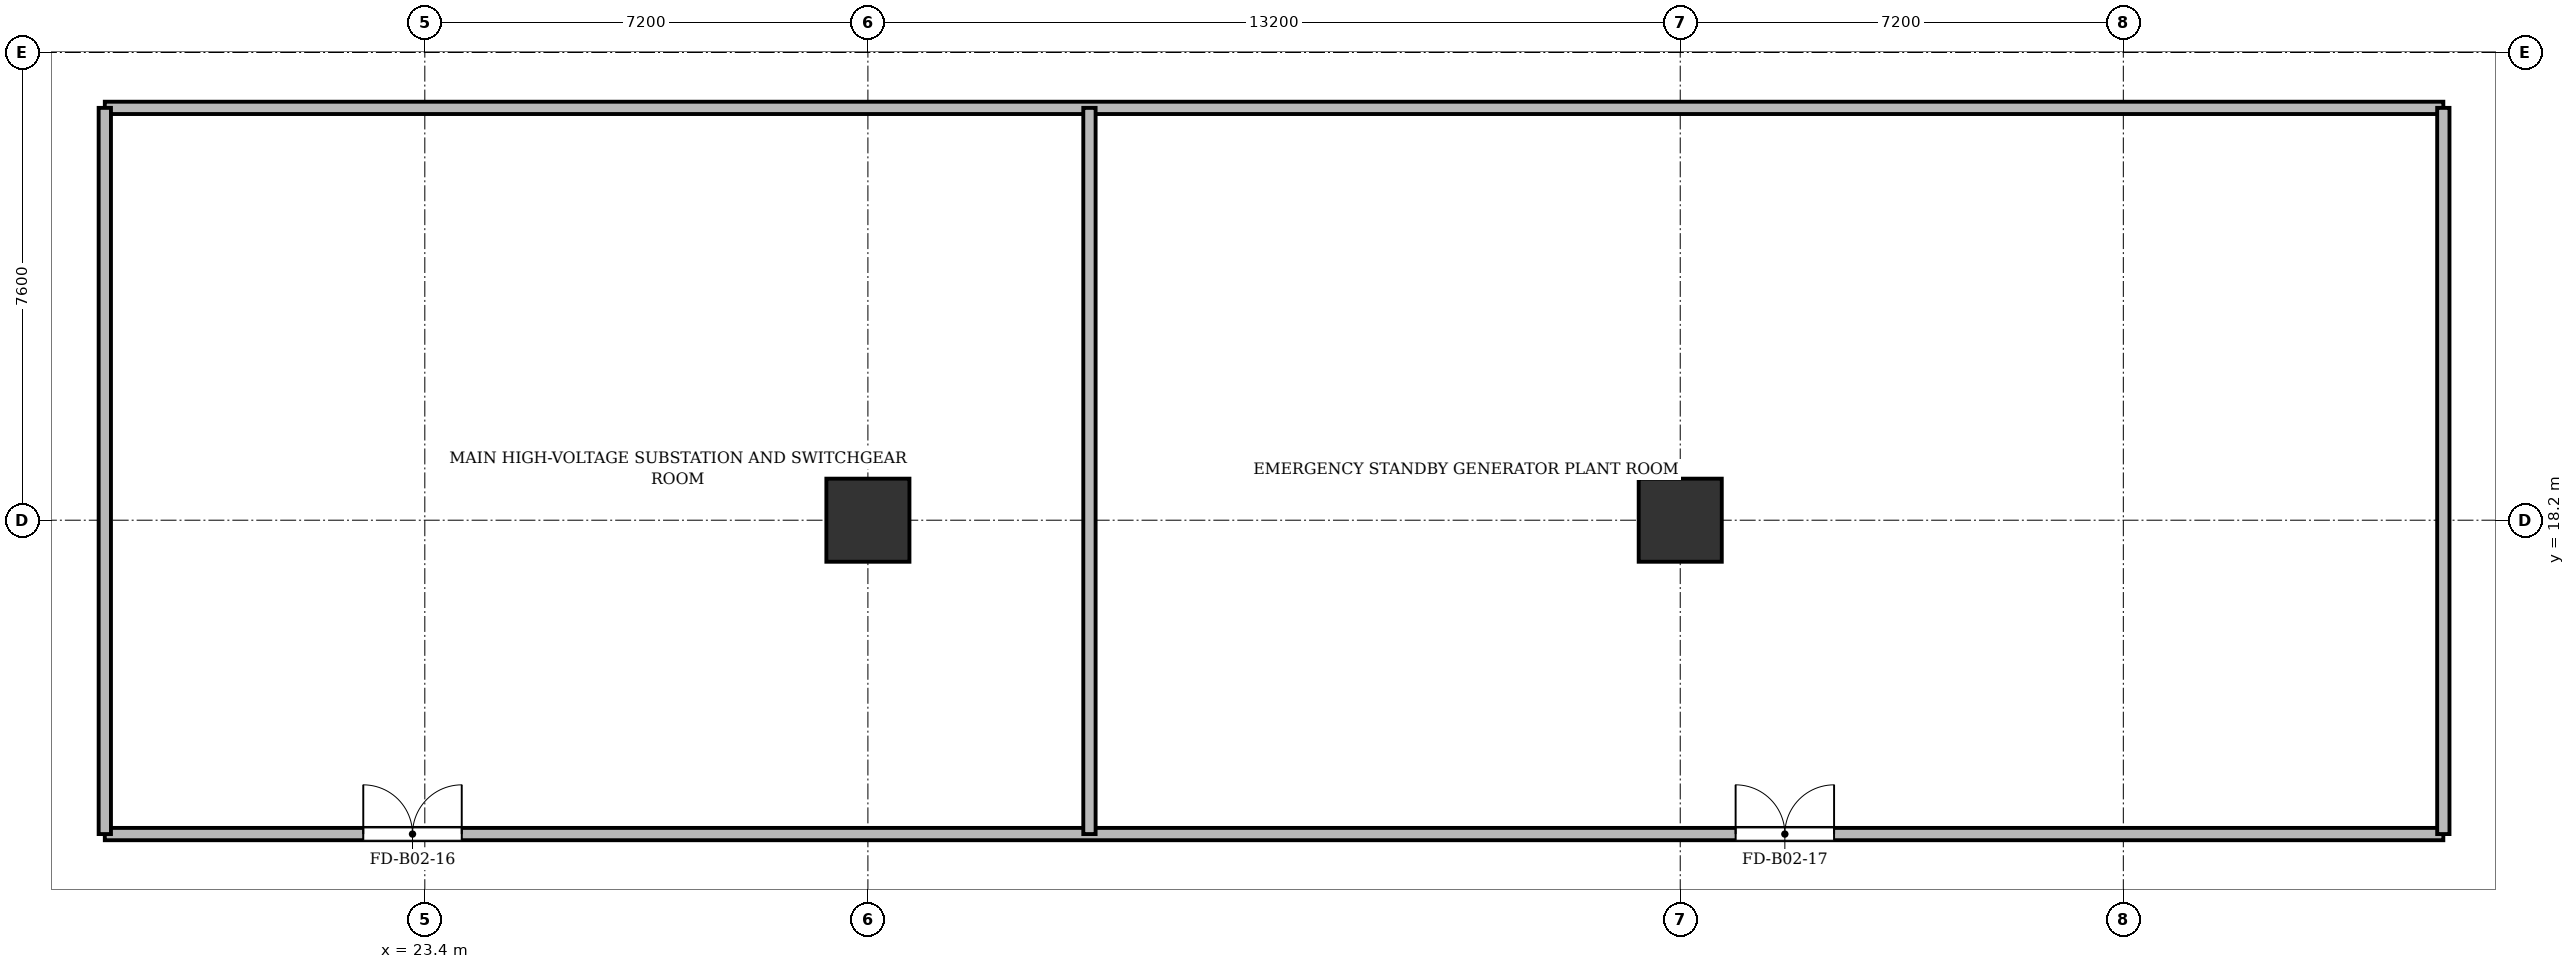
"""IFC4 building model, lengths in metres.
Left out: names, types, materials, properties, quantities, classifications, styles, units other than length and angle.
Written with IfcOpenShell. Run it as: python <this file> out.ifc"""

import sys

from ifc_helpers import new_model, si_unit, direction, frame, frame_2d, origin, origin_2d, place, context, subcontext, project, spatial, rectangle, extrude, source, transform, mapped, element, fill, save


model = new_model("IFC4")
c1 = context("Model", 3, precision=1e-05, world=origin(), true_north=direction((0.0, 1.0)))
c2 = subcontext(c1, "Body", "Model", "MODEL_VIEW")
j1 = project(units=[si_unit("LENGTHUNIT", "METRE"), si_unit("PLANEANGLEUNIT", "RADIAN")], contexts=[c1])
p1 = place(None, origin())
s1 = spatial("IfcSite", under=j1, at=p1, CompositionType="ELEMENT")
p2 = place(p1, origin())
s2 = spatial("IfcBuilding", under=s1, at=p2, CompositionType="ELEMENT")
p3 = place(p2, frame((0.0, 0.0, -8.6)))
s3 = spatial("IfcBuildingStorey", under=s2, at=p3, CompositionType="ELEMENT", Elevation=-8.6)
m1 = source(origin(), c2, "Body", "SweptSolid", [
    extrude(rectangle(XDim=1.35, YDim=1.35, at=origin_2d()), origin(), (0.0, 0.0, 1.0), 4.3),
])
for number, where, z_axis, x_axis in (
    (1, (30.6, 18.2, 0.0), (0.0, 0.0, 1.0), (1.0, 0.0, 0.0)),
    (2, (43.8, 18.2, 0.0), (0.0, 0.0, 1.0), (1.0, 0.0, 0.0)),
):
    element("IfcColumn", number, at=place(p3, frame(where, z_axis=z_axis, x_axis=x_axis)), inside=s3, PredefinedType="COLUMN", context=c2, shape_type="MappedRepresentation", body=[
        mapped(m1, transform((0.0, 0.0, 0.0), x_axis=(1.0, 0.0, 0.0), y_axis=(0.0, 1.0, 0.0), z_axis=(0.0, 0.0, 1.0), scale=1.0)),
    ])
p4 = place(p3, frame((18.2, 13.1, 0.0), z_axis=(0.0, 0.0, 1.0), x_axis=(1.0, 0.0, 0.0)))
e3 = element("IfcWall", 3, at=p4, inside=s3, PredefinedType="PARTITIONING", context=c2, shape_type="SweptSolid", body=[
    extrude(rectangle(XDim=38.0, YDim=0.2, at=frame_2d((19.0, 0.0))), origin(), (0.0, 0.0, 1.0), 3.33),
])
p5 = place(p4, frame((4.2, 0.0, 0.0)))
e4 = element("IfcOpeningElement", 4, at=p5, cuts=e3, PredefinedType="OPENING", context=c2, shape_type="SweptSolid", body=[
    extrude(rectangle(XDim=1.6, YDim=2.2, at=frame_2d((0.8, 1.1))), frame((0.0, 0.11, 0.0), z_axis=(0.0, -1.0, 0.0), x_axis=(1.0, 0.0, 0.0)), (0.0, 0.0, 1.0), 0.22),
])
p6 = place(p4, frame((26.5, 0.0, 0.0)))
e5 = element("IfcOpeningElement", 5, at=p6, cuts=e3, PredefinedType="OPENING", context=c2, shape_type="SweptSolid", body=[
    extrude(rectangle(XDim=1.6, YDim=2.2, at=frame_2d((0.8, 1.1))), frame((0.0, 0.11, 0.0), z_axis=(0.0, -1.0, 0.0), x_axis=(1.0, 0.0, 0.0)), (0.0, 0.0, 1.0), 0.22),
])
p7 = place(p3, frame((18.2, 24.9, 0.0), z_axis=(0.0, 0.0, 1.0), x_axis=(1.0, 0.0, 0.0)))
e6 = element("IfcWall", 6, at=p7, inside=s3, PredefinedType="PARTITIONING", context=c2, shape_type="SweptSolid", body=[
    extrude(rectangle(XDim=38.0, YDim=0.2, at=frame_2d((19.0, 0.0))), origin(), (0.0, 0.0, 1.0), 3.33),
])
for number, where, z_axis, x_axis in (
    (7, (18.2, 13.1, 0.0), (0.0, 0.0, 1.0), (0.0, 1.0, 0.0)),
    (8, (56.2, 13.1, 0.0), (0.0, 0.0, 1.0), (0.0, 1.0, 0.0)),
    (9, (34.2, 13.1, 0.0), (0.0, 0.0, 1.0), (0.0, 1.0, 0.0)),
):
    element("IfcWall", number, at=place(p3, frame(where, z_axis=z_axis, x_axis=x_axis)), inside=s3, PredefinedType="PARTITIONING", context=c2, shape_type="SweptSolid", body=[
        extrude(rectangle(XDim=11.8, YDim=0.2, at=frame_2d((5.9, 0.0))), origin(), (0.0, 0.0, 1.0), 3.28),
    ])
m2 = source(origin(), c2, "Body", "SweptSolid", [
    extrude(rectangle(XDim=1.6, YDim=2.2, at=frame_2d((0.8, 1.1))), frame((0.0, 0.025, 0.0), z_axis=(0.0, -1.0, 0.0), x_axis=(1.0, 0.0, 0.0)), (0.0, 0.0, 1.0), 0.05),
])
p8 = place(p5, origin())
e10 = element("IfcDoor", 10, at=p8, inside=s3, OperationType="DOUBLE_DOOR_SINGLE_SWING", PredefinedType="DOOR", context=c2, shape_type="MappedRepresentation", body=[
    mapped(m2, transform((0.0, 0.0, 0.0), x_axis=(1.0, 0.0, 0.0), y_axis=(0.0, 1.0, 0.0), z_axis=(0.0, 0.0, 1.0), scale=1.0)),
])
fill(e4, e10)
p9 = place(p6, origin())
e11 = element("IfcDoor", 11, at=p9, inside=s3, OperationType="DOUBLE_DOOR_SINGLE_SWING", PredefinedType="DOOR", context=c2, shape_type="MappedRepresentation", body=[
    mapped(m2, transform((0.0, 0.0, 0.0), x_axis=(1.0, 0.0, 0.0), y_axis=(0.0, 1.0, 0.0), z_axis=(0.0, 0.0, 1.0), scale=1.0)),
])
fill(e5, e11)
save(model, sys.argv[1])
